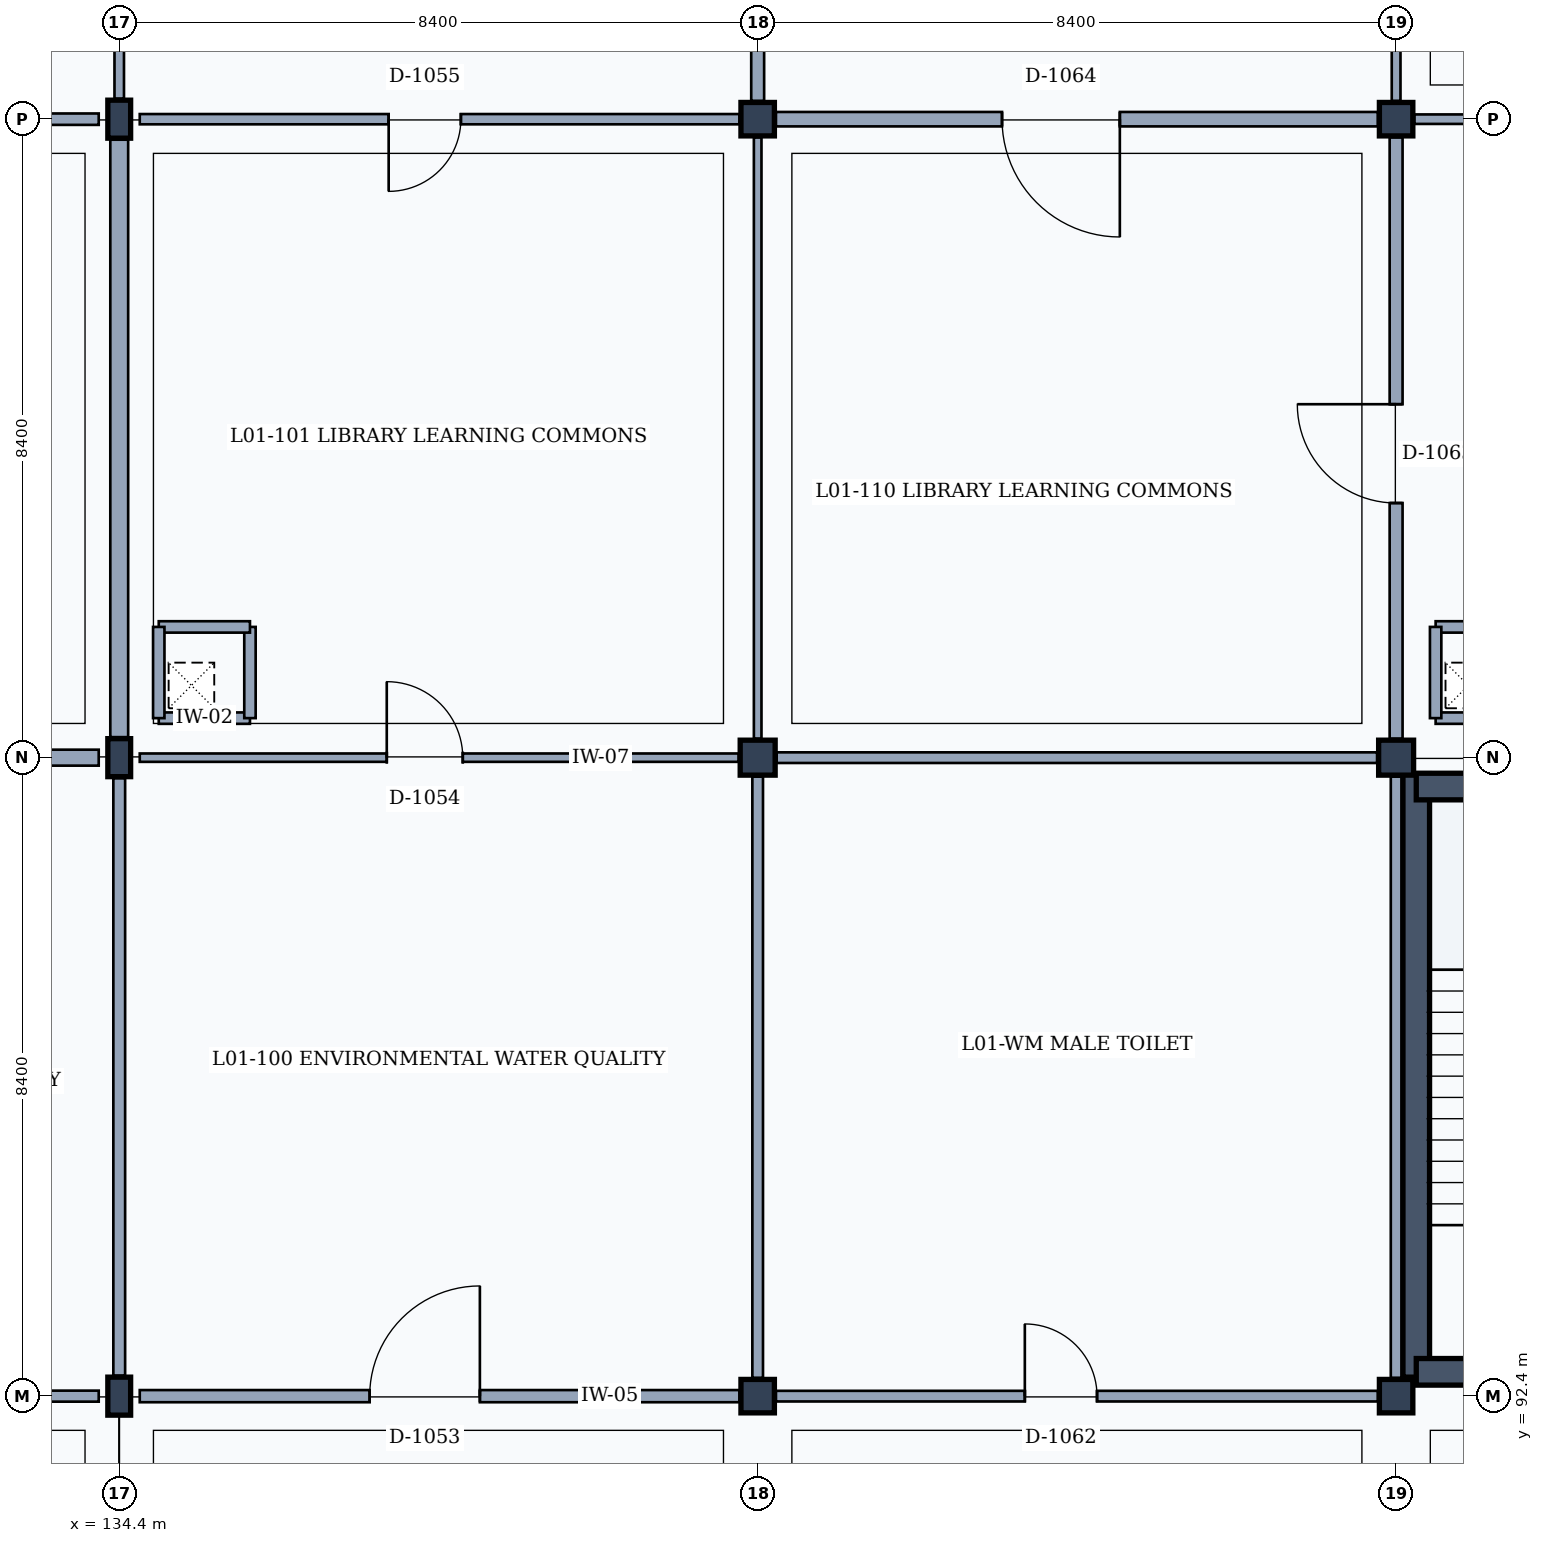
"""IFC4 building model, lengths in metres.
Left out: names, types, materials, properties, quantities, classifications, styles, units other than length and angle.
Written with IfcOpenShell. Run it as: python <this file> out.ifc"""

import sys

from ifc_helpers import new_model, si_unit, direction, frame, frame_2d, origin, origin_2d, place, context, subcontext, project, spatial, rectangle, i_section, extrude, element, fill, save


model = new_model("IFC4")
c1 = context("Model", 3, precision=1e-05, world=origin(), true_north=direction((0.0, 1.0)))
c2 = subcontext(c1, "Body", "Model", "MODEL_VIEW")
j1 = project(units=[si_unit("LENGTHUNIT", "METRE"), si_unit("PLANEANGLEUNIT", "RADIAN")], contexts=[c1])
p1 = place(None, origin())
s1 = spatial("IfcSite", under=j1, at=p1, CompositionType="ELEMENT")
p2 = place(p1, origin())
s2 = spatial("IfcBuilding", under=s1, at=p2, CompositionType="ELEMENT")
p3 = place(p2, frame((0.0, 0.0, 4.8)))
s3 = spatial("IfcBuildingStorey", under=s2, at=p3, CompositionType="ELEMENT", Elevation=4.8)
for number, where, z_axis, x_axis in (
    (1, (134.4, 92.4, 0.0), (0.0, 0.0, 1.0), (1.0, 0.0, 0.0)),
    (2, (134.4, 100.8, 0.0), (0.0, 0.0, 1.0), (1.0, 0.0, 0.0)),
    (3, (134.4, 109.2, 0.0), (0.0, 0.0, 1.0), (1.0, 0.0, 0.0)),
):
    element("IfcColumn", number, at=place(p3, frame(where, z_axis=z_axis, x_axis=x_axis)), inside=s3, PredefinedType="COLUMN", context=c2, shape_type="SweptSolid", body=[
        extrude(i_section(OverallWidth=0.3, OverallDepth=0.5, WebThickness=0.014, FlangeThickness=0.028, FilletRadius=0.027, at=origin_2d()), origin(), (0.0, 0.0, 1.0), 4.8),
    ])
p4 = place(p3, frame((142.8, 92.4, 0.0), z_axis=(0.0, 0.0, 1.0), x_axis=(1.0, 0.0, 0.0)))
e4 = element("IfcColumn", 4, at=p4, inside=s3, PredefinedType="COLUMN", context=c2, shape_type="SweptSolid", body=[
    extrude(rectangle(XDim=0.44, YDim=0.44, at=origin_2d()), origin(), (0.0, 0.0, 1.0), 4.8),
])
p5 = place(p3, frame((142.8, 100.8, 0.0), z_axis=(0.0, 0.0, 1.0), x_axis=(1.0, 0.0, 0.0)))
e5 = element("IfcColumn", 5, at=p5, inside=s3, PredefinedType="COLUMN", context=c2, shape_type="SweptSolid", body=[
    extrude(rectangle(XDim=0.46, YDim=0.46, at=origin_2d()), origin(), (0.0, 0.0, 1.0), 4.8),
])
for number, where, z_axis, x_axis in (
    (6, (142.8, 109.2, 0.0), (0.0, 0.0, 1.0), (1.0, 0.0, 0.0)),
    (7, (151.2, 92.4, 0.0), (0.0, 0.0, 1.0), (1.0, 0.0, 0.0)),
):
    element("IfcColumn", number, at=place(p3, frame(where, z_axis=z_axis, x_axis=x_axis)), inside=s3, PredefinedType="COLUMN", context=c2, shape_type="SweptSolid", body=[
        extrude(rectangle(XDim=0.44, YDim=0.44, at=origin_2d()), origin(), (0.0, 0.0, 1.0), 4.8),
    ])
p6 = place(p3, frame((151.2, 100.8, 0.0), z_axis=(0.0, 0.0, 1.0), x_axis=(1.0, 0.0, 0.0)))
e8 = element("IfcColumn", 8, at=p6, inside=s3, PredefinedType="COLUMN", context=c2, shape_type="SweptSolid", body=[
    extrude(rectangle(XDim=0.46, YDim=0.46, at=origin_2d()), origin(), (0.0, 0.0, 1.0), 4.8),
])
p7 = place(p3, frame((151.2, 109.2, 0.0), z_axis=(0.0, 0.0, 1.0), x_axis=(1.0, 0.0, 0.0)))
e9 = element("IfcColumn", 9, at=p7, inside=s3, PredefinedType="COLUMN", context=c2, shape_type="SweptSolid", body=[
    extrude(rectangle(XDim=0.44, YDim=0.44, at=origin_2d()), origin(), (0.0, 0.0, 1.0), 4.8),
])
p8 = place(p3, frame((151.465, 92.65, 0.0), z_axis=(0.0, 0.0, 1.0), x_axis=(0.0, 1.0, 0.0)))
e10 = element("IfcWall", 10, at=p8, inside=s3, PredefinedType="SHEAR", context=c2, shape_type="SweptSolid", body=[
    extrude(rectangle(XDim=7.94, YDim=0.35, at=frame_2d((3.97, 0.0))), origin(), (0.0, 0.0, 1.0), 4.55),
])
for number, where, z_axis, x_axis in (
    (11, (151.465, 100.42, 0.0), (0.0, 0.0, 1.0), (1.0, 0.0, 0.0)),
    (12, (159.34, 92.72, 0.0), (0.0, 0.0, 1.0), (-1.0, 0.0, 0.0)),
):
    element("IfcWall", number, at=place(p3, frame(where, z_axis=z_axis, x_axis=x_axis)), inside=s3, PredefinedType="SHEAR", context=c2, shape_type="SweptSolid", body=[
        extrude(rectangle(XDim=7.875, YDim=0.35, at=frame_2d((3.938, 0.0))), origin(), (0.0, 0.0, 1.0), 4.55),
    ])
p9 = place(p3, frame((134.92, 101.32, 0.0), z_axis=(0.0, 0.0, 1.0), x_axis=(1.0, 0.0, 0.0)))
e13 = element("IfcWall", 13, at=p9, inside=s3, PredefinedType="PARTITIONING", context=c2, shape_type="SweptSolid", body=[
    extrude(rectangle(XDim=1.2, YDim=0.15, at=frame_2d((0.6, 0.0))), origin(), (0.0, 0.0, 1.0), 4.55),
])
p10 = place(p3, frame((136.12, 101.32, 0.0), z_axis=(0.0, 0.0, 1.0), x_axis=(0.0, 1.0, 0.0)))
e14 = element("IfcWall", 14, at=p10, inside=s3, PredefinedType="PARTITIONING", context=c2, shape_type="SweptSolid", body=[
    extrude(rectangle(XDim=1.2, YDim=0.15, at=frame_2d((0.6, 0.0))), origin(), (0.0, 0.0, 1.0), 4.55),
])
p11 = place(p3, frame((136.12, 102.52, 0.0), z_axis=(0.0, 0.0, 1.0), x_axis=(-1.0, 0.0, 0.0)))
e15 = element("IfcWall", 15, at=p11, inside=s3, PredefinedType="PARTITIONING", context=c2, shape_type="SweptSolid", body=[
    extrude(rectangle(XDim=1.2, YDim=0.15, at=frame_2d((0.6, 0.0))), origin(), (0.0, 0.0, 1.0), 4.55),
])
for number, where, z_axis, x_axis in (
    (16, (134.92, 102.52, 0.0), (0.0, 0.0, 1.0), (0.0, -1.0, 0.0)),
    (17, (151.72, 101.32, 0.0), (0.0, 0.0, 1.0), (1.0, 0.0, 0.0)),
    (18, (152.92, 102.52, 0.0), (0.0, 0.0, 1.0), (-1.0, 0.0, 0.0)),
    (19, (151.72, 102.52, 0.0), (0.0, 0.0, 1.0), (0.0, -1.0, 0.0)),
):
    element("IfcWall", number, at=place(p3, frame(where, z_axis=z_axis, x_axis=x_axis)), inside=s3, PredefinedType="PARTITIONING", context=c2, shape_type="SweptSolid", body=[
        extrude(rectangle(XDim=1.2, YDim=0.15, at=frame_2d((0.6, 0.0))), origin(), (0.0, 0.0, 1.0), 4.55),
    ])
p12 = place(p3, frame((126.23, 92.4, 0.0), z_axis=(0.0, 0.0, 1.0), x_axis=(1.0, 0.0, 0.0)))
e20 = element("IfcWall", 20, at=p12, inside=s3, PredefinedType="PARTITIONING", context=c2, shape_type="SweptSolid", body=[
    extrude(rectangle(XDim=7.9, YDim=0.145, at=frame_2d((3.95, 0.0))), origin(), (0.0, 0.0, 1.0), 3.92),
])
p13 = place(p12, frame((3.05, 0.0, 0.0)))
e21 = element("IfcOpeningElement", 21, at=p13, cuts=e20, PredefinedType="OPENING", context=c2, shape_type="SweptSolid", body=[
    extrude(rectangle(XDim=1.4, YDim=2.25, at=frame_2d((0.7, 1.125))), frame((0.0, 0.083, 0.0), z_axis=(0.0, -1.0, 0.0), x_axis=(1.0, 0.0, 0.0)), (0.0, 0.0, 1.0), 0.165),
])
p14 = place(p3, frame((134.4, 92.67, 0.0), z_axis=(0.0, 0.0, 1.0), x_axis=(0.0, 1.0, 0.0)))
e22 = element("IfcWall", 22, at=p14, inside=s3, PredefinedType="PARTITIONING", context=c2, shape_type="SweptSolid", body=[
    extrude(rectangle(XDim=7.86, YDim=0.155, at=frame_2d((3.93, 0.0))), origin(), (0.0, 0.0, 1.0), 3.92),
])
p15 = place(p3, frame((126.23, 100.8, 0.0), z_axis=(0.0, 0.0, 1.0), x_axis=(1.0, 0.0, 0.0)))
e23 = element("IfcWall", 23, at=p15, inside=s3, PredefinedType="PARTITIONING", context=c2, shape_type="SweptSolid", body=[
    extrude(rectangle(XDim=7.9, YDim=0.21, at=frame_2d((3.95, 0.0))), origin(), (0.0, 0.0, 1.0), 3.92),
])
p16 = place(p15, frame((3.0, 0.0, 0.0)))
e24 = element("IfcOpeningElement", 24, at=p16, cuts=e23, PredefinedType="OPENING", context=c2, shape_type="SweptSolid", body=[
    extrude(rectangle(XDim=1.5, YDim=2.3, at=frame_2d((0.75, 1.15))), frame((0.0, 0.115, 0.0), z_axis=(0.0, -1.0, 0.0), x_axis=(1.0, 0.0, 0.0)), (0.0, 0.0, 1.0), 0.23),
])
p17 = place(p3, frame((134.4, 101.07, 0.0), z_axis=(0.0, 0.0, 1.0), x_axis=(0.0, 1.0, 0.0)))
e25 = element("IfcWall", 25, at=p17, inside=s3, PredefinedType="PARTITIONING", context=c2, shape_type="SweptSolid", body=[
    extrude(rectangle(XDim=7.86, YDim=0.235, at=frame_2d((3.93, 0.0))), origin(), (0.0, 0.0, 1.0), 3.92),
])
p18 = place(p3, frame((126.23, 109.2, 0.0), z_axis=(0.0, 0.0, 1.0), x_axis=(1.0, 0.0, 0.0)))
e26 = element("IfcWall", 26, at=p18, inside=s3, PredefinedType="PARTITIONING", context=c2, shape_type="SweptSolid", body=[
    extrude(rectangle(XDim=7.9, YDim=0.15, at=frame_2d((3.95, 0.0))), origin(), (0.0, 0.0, 1.0), 3.92),
])
p19 = place(p18, frame((2.925, 0.0, 0.0)))
e27 = element("IfcOpeningElement", 27, at=p19, cuts=e26, PredefinedType="OPENING", context=c2, shape_type="SweptSolid", body=[
    extrude(rectangle(XDim=1.65, YDim=2.25, at=frame_2d((0.825, 1.125))), frame((0.0, 0.085, 0.0), z_axis=(0.0, -1.0, 0.0), x_axis=(1.0, 0.0, 0.0)), (0.0, 0.0, 1.0), 0.17),
])
p20 = place(p3, frame((134.4, 109.47, 0.0), z_axis=(0.0, 0.0, 1.0), x_axis=(0.0, 1.0, 0.0)))
e28 = element("IfcWall", 28, at=p20, inside=s3, PredefinedType="PARTITIONING", context=c2, shape_type="SweptSolid", body=[
    extrude(rectangle(XDim=7.86, YDim=0.125, at=frame_2d((3.93, 0.0))), origin(), (0.0, 0.0, 1.0), 3.92),
])
p21 = place(p3, frame((134.67, 92.4, 0.0), z_axis=(0.0, 0.0, 1.0), x_axis=(1.0, 0.0, 0.0)))
e29 = element("IfcWall", 29, at=p21, inside=s3, PredefinedType="PARTITIONING", context=c2, shape_type="SweptSolid", body=[
    extrude(rectangle(XDim=7.89, YDim=0.16, at=frame_2d((3.945, 0.0))), origin(), (0.0, 0.0, 1.0), 3.91),
])
p22 = place(p21, frame((3.025, 0.0, 0.0)))
e30 = element("IfcOpeningElement", 30, at=p22, cuts=e29, PredefinedType="OPENING", context=c2, shape_type="SweptSolid", body=[
    extrude(rectangle(XDim=1.45, YDim=2.35, at=frame_2d((0.725, 1.175))), frame((0.0, 0.09, 0.0), z_axis=(0.0, -1.0, 0.0), x_axis=(1.0, 0.0, 0.0)), (0.0, 0.0, 1.0), 0.18),
])
p23 = place(p3, frame((142.8, 92.64, 0.0), z_axis=(0.0, 0.0, 1.0), x_axis=(0.0, 1.0, 0.0)))
e31 = element("IfcWall", 31, at=p23, inside=s3, PredefinedType="PARTITIONING", context=c2, shape_type="SweptSolid", body=[
    extrude(rectangle(XDim=7.91, YDim=0.14, at=frame_2d((3.955, 0.0))), origin(), (0.0, 0.0, 1.0), 3.92),
])
p24 = place(p3, frame((134.67, 100.8, 0.0), z_axis=(0.0, 0.0, 1.0), x_axis=(1.0, 0.0, 0.0)))
e32 = element("IfcWall", 32, at=p24, inside=s3, PredefinedType="PARTITIONING", context=c2, shape_type="SweptSolid", body=[
    extrude(rectangle(XDim=7.88, YDim=0.11, at=frame_2d((3.94, 0.0))), origin(), (0.0, 0.0, 1.0), 3.91),
])
p25 = place(p24, frame((3.25, 0.0, 0.0)))
e33 = element("IfcOpeningElement", 33, at=p25, cuts=e32, PredefinedType="OPENING", context=c2, shape_type="SweptSolid", body=[
    extrude(rectangle(XDim=1.0, YDim=2.15, at=frame_2d((0.5, 1.075))), frame((0.0, 0.065, 0.0), z_axis=(0.0, -1.0, 0.0), x_axis=(1.0, 0.0, 0.0)), (0.0, 0.0, 1.0), 0.13),
])
p26 = place(p3, frame((142.8, 101.05, 0.0), z_axis=(0.0, 0.0, 1.0), x_axis=(0.0, 1.0, 0.0)))
e34 = element("IfcWall", 34, at=p26, inside=s3, PredefinedType="MOVABLE", context=c2, shape_type="SweptSolid", body=[
    extrude(rectangle(XDim=7.91, YDim=0.1, at=frame_2d((3.955, 0.0))), origin(), (0.0, 0.0, 1.0), 3.92),
])
p27 = place(p3, frame((134.67, 109.2, 0.0), z_axis=(0.0, 0.0, 1.0), x_axis=(1.0, 0.0, 0.0)))
e35 = element("IfcWall", 35, at=p27, inside=s3, PredefinedType="PARTITIONING", context=c2, shape_type="SweptSolid", body=[
    extrude(rectangle(XDim=7.89, YDim=0.135, at=frame_2d((3.945, 0.0))), origin(), (0.0, 0.0, 1.0), 3.91),
])
p28 = place(p27, frame((3.275, 0.0, 0.0)))
e36 = element("IfcOpeningElement", 36, at=p28, cuts=e35, PredefinedType="OPENING", context=c2, shape_type="SweptSolid", body=[
    extrude(rectangle(XDim=0.95, YDim=2.15, at=frame_2d((0.475, 1.075))), frame((0.0, 0.077, 0.0), z_axis=(0.0, -1.0, 0.0), x_axis=(1.0, 0.0, 0.0)), (0.0, 0.0, 1.0), 0.155),
])
p29 = place(p3, frame((142.8, 109.44, 0.0), z_axis=(0.0, 0.0, 1.0), x_axis=(0.0, 1.0, 0.0)))
e37 = element("IfcWall", 37, at=p29, inside=s3, PredefinedType="PARTITIONING", context=c2, shape_type="SweptSolid", body=[
    extrude(rectangle(XDim=7.91, YDim=0.17, at=frame_2d((3.955, 0.0))), origin(), (0.0, 0.0, 1.0), 3.92),
])
p30 = place(p3, frame((143.04, 92.4, 0.0), z_axis=(0.0, 0.0, 1.0), x_axis=(1.0, 0.0, 0.0)))
e38 = element("IfcWall", 38, at=p30, inside=s3, PredefinedType="PARTITIONING", context=c2, shape_type="SweptSolid", body=[
    extrude(rectangle(XDim=7.92, YDim=0.14, at=frame_2d((3.96, 0.0))), origin(), (0.0, 0.0, 1.0), 3.92),
])
p31 = place(p30, frame((3.275, 0.0, 0.0)))
e39 = element("IfcOpeningElement", 39, at=p31, cuts=e38, PredefinedType="OPENING", context=c2, shape_type="SweptSolid", body=[
    extrude(rectangle(XDim=0.95, YDim=2.15, at=frame_2d((0.475, 1.075))), frame((0.0, 0.08, 0.0), z_axis=(0.0, -1.0, 0.0), x_axis=(1.0, 0.0, 0.0)), (0.0, 0.0, 1.0), 0.16),
])
p32 = place(p3, frame((151.2, 92.64, 0.0), z_axis=(0.0, 0.0, 1.0), x_axis=(0.0, 1.0, 0.0)))
e40 = element("IfcWall", 40, at=p32, inside=s3, PredefinedType="PARTITIONING", context=c2, shape_type="SweptSolid", body=[
    extrude(rectangle(XDim=7.91, YDim=0.14, at=frame_2d((3.955, 0.0))), origin(), (0.0, 0.0, 1.0), 3.92),
])
p33 = place(p3, frame((143.05, 100.8, 0.0), z_axis=(0.0, 0.0, 1.0), x_axis=(1.0, 0.0, 0.0)))
e41 = element("IfcWall", 41, at=p33, inside=s3, PredefinedType="PARTITIONING", context=c2, shape_type="SweptSolid", body=[
    extrude(rectangle(XDim=7.9, YDim=0.14, at=frame_2d((3.95, 0.0))), origin(), (0.0, 0.0, 1.0), 3.92),
])
p34 = place(p3, frame((151.2, 101.05, 0.0), z_axis=(0.0, 0.0, 1.0), x_axis=(0.0, 1.0, 0.0)))
e42 = element("IfcWall", 42, at=p34, inside=s3, PredefinedType="PARTITIONING", context=c2, shape_type="SweptSolid", body=[
    extrude(rectangle(XDim=7.91, YDim=0.17, at=frame_2d((3.955, 0.0))), origin(), (0.0, 0.0, 1.0), 3.92),
])
p35 = place(p34, frame((3.1, 0.0, 0.0)))
e43 = element("IfcOpeningElement", 43, at=p35, cuts=e42, PredefinedType="OPENING", context=c2, shape_type="SweptSolid", body=[
    extrude(rectangle(XDim=1.3, YDim=2.2, at=frame_2d((0.65, 1.1))), frame((0.0, 0.095, 0.0), z_axis=(0.0, -1.0, 0.0), x_axis=(1.0, 0.0, 0.0)), (0.0, 0.0, 1.0), 0.19),
])
p36 = place(p3, frame((143.04, 109.2, 0.0), z_axis=(0.0, 0.0, 1.0), x_axis=(1.0, 0.0, 0.0)))
e44 = element("IfcWall", 44, at=p36, inside=s3, PredefinedType="PARTITIONING", context=c2, shape_type="SweptSolid", body=[
    extrude(rectangle(XDim=7.92, YDim=0.19, at=frame_2d((3.96, 0.0))), origin(), (0.0, 0.0, 1.0), 3.92),
])
p37 = place(p36, frame((2.975, 0.0, 0.0)))
e45 = element("IfcOpeningElement", 45, at=p37, cuts=e44, PredefinedType="OPENING", context=c2, shape_type="SweptSolid", body=[
    extrude(rectangle(XDim=1.55, YDim=2.35, at=frame_2d((0.775, 1.175))), frame((0.0, 0.105, 0.0), z_axis=(0.0, -1.0, 0.0), x_axis=(1.0, 0.0, 0.0)), (0.0, 0.0, 1.0), 0.21),
])
p38 = place(p3, frame((151.2, 109.44, 0.0), z_axis=(0.0, 0.0, 1.0), x_axis=(0.0, 1.0, 0.0)))
e46 = element("IfcWall", 46, at=p38, inside=s3, PredefinedType="PARTITIONING", context=c2, shape_type="SweptSolid", body=[
    extrude(rectangle(XDim=7.91, YDim=0.115, at=frame_2d((3.955, 0.0))), origin(), (0.0, 0.0, 1.0), 3.92),
])
p39 = place(p3, frame((151.44, 109.2, 0.0), z_axis=(0.0, 0.0, 1.0), x_axis=(1.0, 0.0, 0.0)))
e47 = element("IfcWall", 47, at=p39, inside=s3, PredefinedType="PARTITIONING", context=c2, shape_type="SweptSolid", body=[
    extrude(rectangle(XDim=7.92, YDim=0.125, at=frame_2d((3.96, 0.0))), origin(), (0.0, 0.0, 1.0), 3.92),
])
p40 = place(p39, frame((3.25, 0.0, 0.0)))
e48 = element("IfcOpeningElement", 48, at=p40, cuts=e47, PredefinedType="OPENING", context=c2, shape_type="SweptSolid", body=[
    extrude(rectangle(XDim=1.0, YDim=2.15, at=frame_2d((0.5, 1.075))), frame((0.0, 0.073, 0.0), z_axis=(0.0, -1.0, 0.0), x_axis=(1.0, 0.0, 0.0)), (0.0, 0.0, 1.0), 0.145),
])
p41 = place(p22, origin())
e49 = element("IfcDoor", 49, at=p41, inside=s3, OperationType="SINGLE_SWING_RIGHT", PredefinedType="DOOR", context=c2, shape_type="SweptSolid", body=[
    extrude(rectangle(XDim=1.45, YDim=2.35, at=frame_2d((0.725, 1.175))), frame((0.0, 0.025, 0.0), z_axis=(0.0, -1.0, 0.0), x_axis=(1.0, 0.0, 0.0)), (0.0, 0.0, 1.0), 0.05),
])
fill(e30, e49)
p42 = place(p25, origin())
e50 = element("IfcDoor", 50, at=p42, inside=s3, OperationType="SINGLE_SWING_LEFT", PredefinedType="DOOR", context=c2, shape_type="SweptSolid", body=[
    extrude(rectangle(XDim=1.0, YDim=2.15, at=frame_2d((0.5, 1.075))), frame((0.0, 0.025, 0.0), z_axis=(0.0, -1.0, 0.0), x_axis=(1.0, 0.0, 0.0)), (0.0, 0.0, 1.0), 0.05),
])
fill(e33, e50)
p43 = place(p28, frame((0.95, 0.0, 0.0), z_axis=(0.0, 0.0, 1.0), x_axis=(-1.0, 0.0, 0.0)))
e51 = element("IfcDoor", 51, at=p43, inside=s3, OperationType="SINGLE_SWING_RIGHT", PredefinedType="DOOR", context=c2, shape_type="SweptSolid", body=[
    extrude(rectangle(XDim=0.95, YDim=2.15, at=frame_2d((0.475, 1.075))), frame((0.0, 0.025, 0.0), z_axis=(0.0, -1.0, 0.0), x_axis=(1.0, 0.0, 0.0)), (0.0, 0.0, 1.0), 0.05),
])
fill(e36, e51)
p44 = place(p31, origin())
e52 = element("IfcDoor", 52, at=p44, inside=s3, OperationType="SINGLE_SWING_LEFT", PredefinedType="DOOR", context=c2, shape_type="SweptSolid", body=[
    extrude(rectangle(XDim=0.95, YDim=2.15, at=frame_2d((0.475, 1.075))), frame((0.0, 0.025, 0.0), z_axis=(0.0, -1.0, 0.0), x_axis=(1.0, 0.0, 0.0)), (0.0, 0.0, 1.0), 0.05),
])
fill(e39, e52)
p45 = place(p35, origin())
e53 = element("IfcDoor", 53, at=p45, inside=s3, OperationType="SINGLE_SWING_RIGHT", PredefinedType="DOOR", context=c2, shape_type="SweptSolid", body=[
    extrude(rectangle(XDim=1.3, YDim=2.2, at=frame_2d((0.65, 1.1))), frame((0.0, 0.025, 0.0), z_axis=(0.0, -1.0, 0.0), x_axis=(1.0, 0.0, 0.0)), (0.0, 0.0, 1.0), 0.05),
])
fill(e43, e53)
p46 = place(p37, frame((1.55, 0.0, 0.0), z_axis=(0.0, 0.0, 1.0), x_axis=(-1.0, 0.0, 0.0)))
e54 = element("IfcDoor", 54, at=p46, inside=s3, OperationType="SINGLE_SWING_LEFT", PredefinedType="DOOR", context=c2, shape_type="SweptSolid", body=[
    extrude(rectangle(XDim=1.55, YDim=2.35, at=frame_2d((0.775, 1.175))), frame((0.0, 0.025, 0.0), z_axis=(0.0, -1.0, 0.0), x_axis=(1.0, 0.0, 0.0)), (0.0, 0.0, 1.0), 0.05),
])
fill(e45, e54)
save(model, sys.argv[1])
